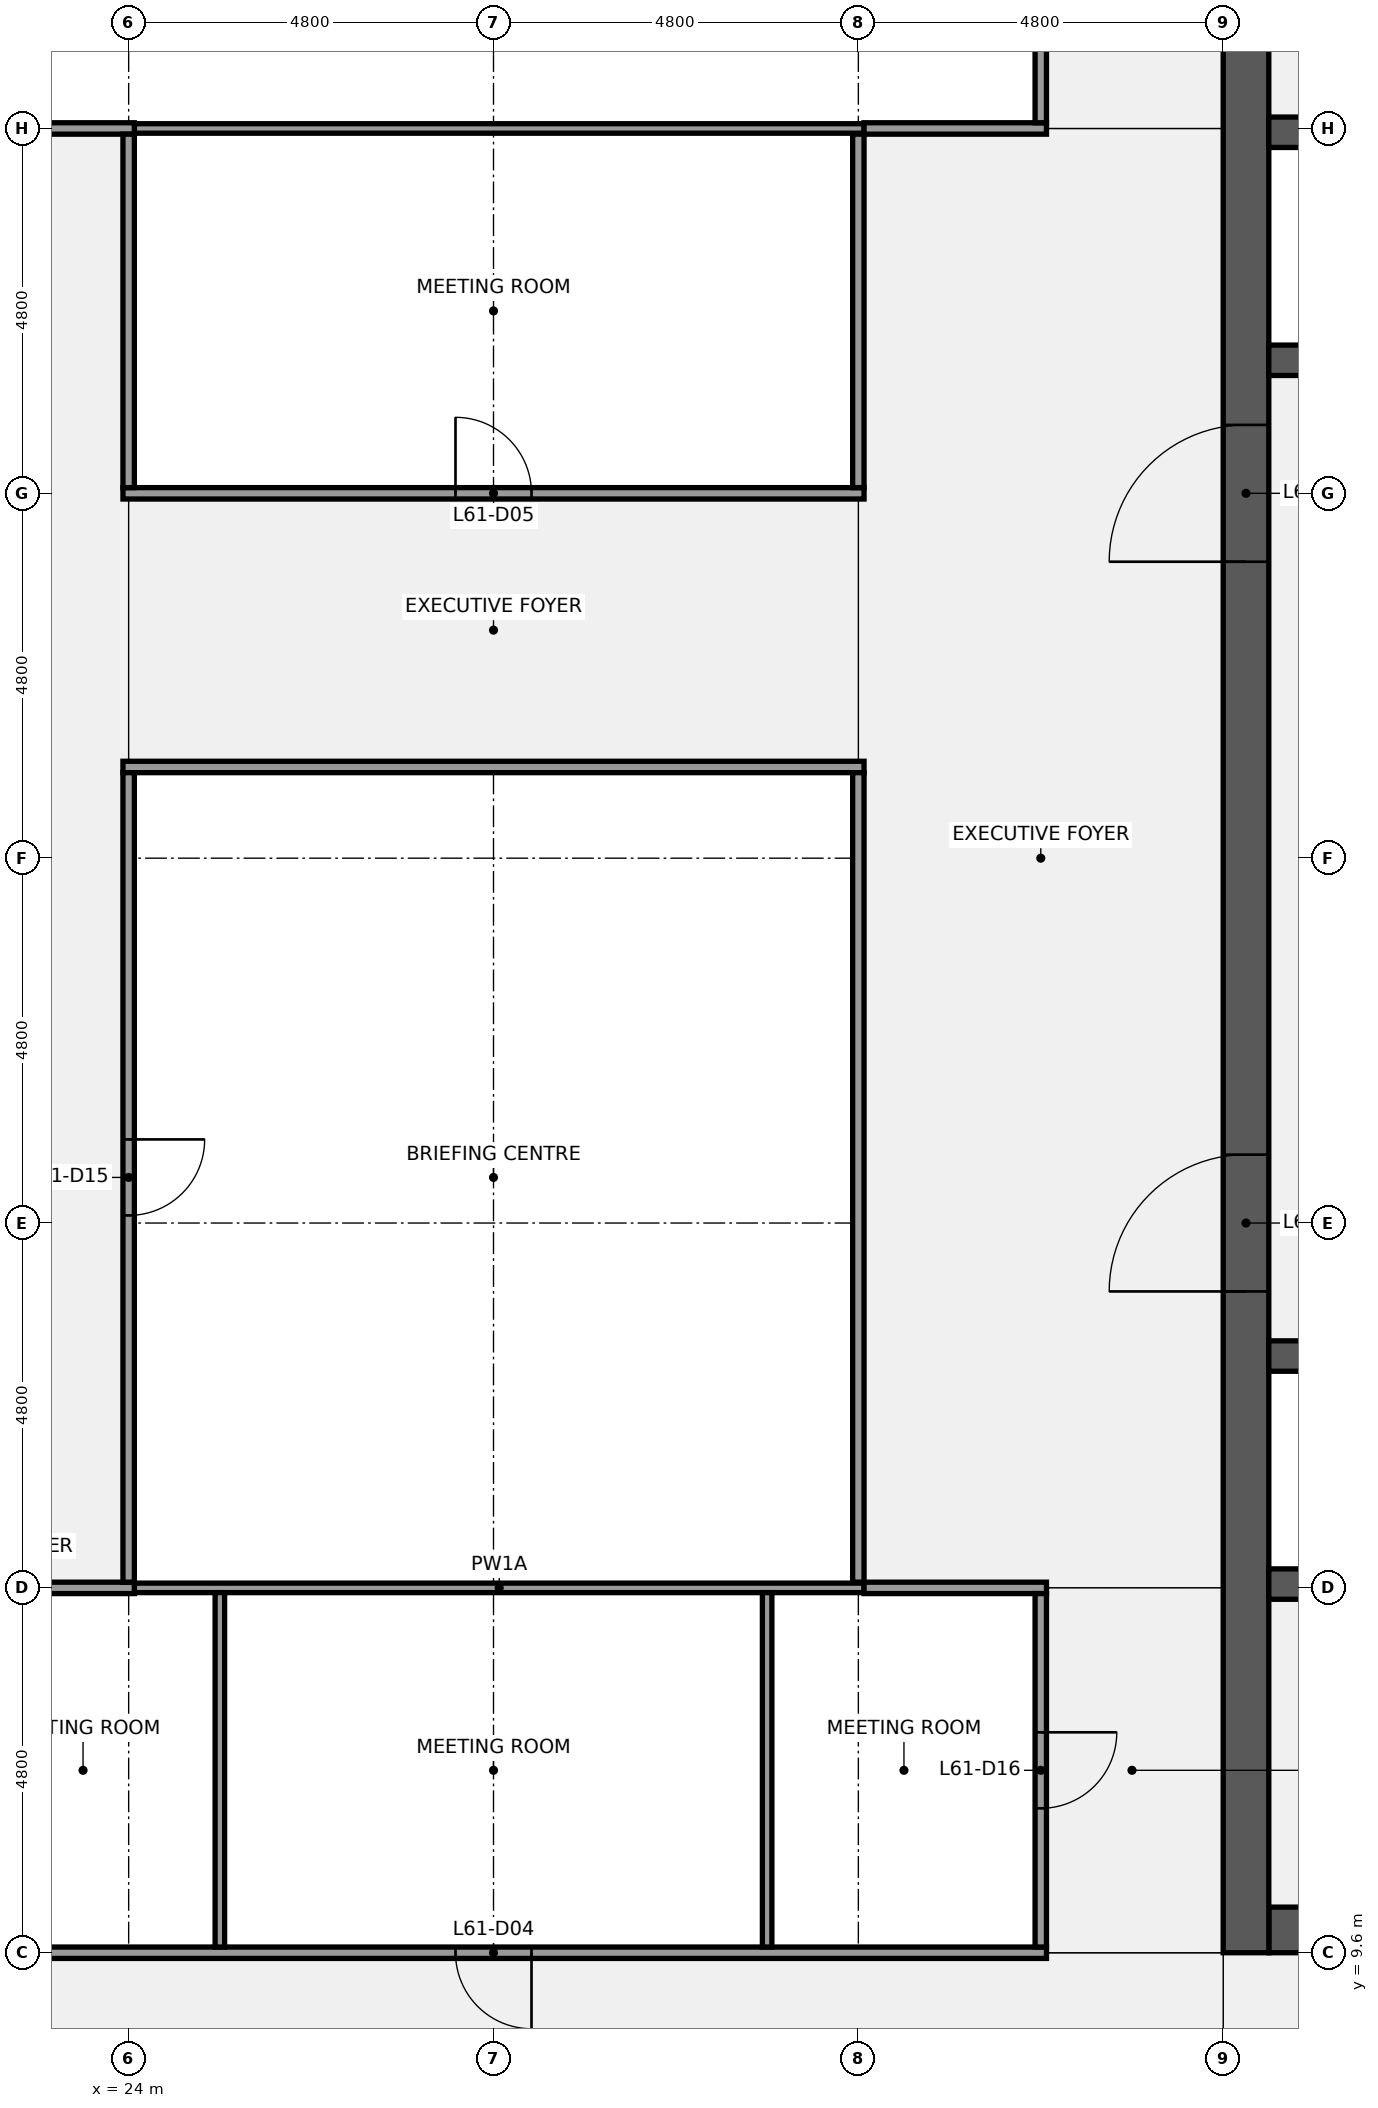
"""IFC4 building model, lengths in metres.
Left out: names, types, materials, properties, quantities, classifications, styles, units other than length and angle.
Written with IfcOpenShell. Run it as: python <this file> out.ifc"""

import sys

from ifc_helpers import new_model, si_unit, direction, frame, frame_2d, origin, place, context, subcontext, project, spatial, rectangle, extrude, element, fill, save


model = new_model("IFC4")
c1 = context("Model", 3, precision=1e-05, world=origin(), true_north=direction((0.0, 1.0)))
c2 = subcontext(c1, "Body", "Model", "MODEL_VIEW")
j1 = project(units=[si_unit("LENGTHUNIT", "METRE"), si_unit("PLANEANGLEUNIT", "RADIAN")], contexts=[c1])
p1 = place(None, origin())
s1 = spatial("IfcSite", under=j1, at=p1, CompositionType="ELEMENT")
p2 = place(p1, origin())
s2 = spatial("IfcBuilding", under=s1, at=p2, CompositionType="ELEMENT")
p3 = place(p2, frame((0.0, 0.0, 282.3)))
s3 = spatial("IfcBuildingStorey", under=s2, at=p3, CompositionType="ELEMENT", Elevation=282.3)
p4 = place(p3, frame((43.2, 9.9, 0.0), z_axis=(0.0, 0.0, 1.0), x_axis=(-1.0, 0.0, 0.0)))
e1 = element("IfcWall", 1, at=p4, inside=s3, PredefinedType="SHEAR", context=c2, shape_type="SweptSolid", body=[
    extrude(rectangle(XDim=4.2, YDim=0.6, at=frame_2d((2.1, 0.0))), origin(), (0.0, 0.0, 1.0), 3.84),
])
p5 = place(p4, frame((1.85, 0.0, 0.0)))
e2 = element("IfcOpeningElement", 2, at=p5, cuts=e1, PredefinedType="OPENING", context=c2, shape_type="SweptSolid", body=[
    extrude(rectangle(XDim=1.1, YDim=2.1, at=frame_2d((0.55, 1.05))), frame((0.0, 0.31, 0.0), z_axis=(0.0, -1.0, 0.0), x_axis=(1.0, 0.0, 0.0)), (0.0, 0.0, 1.0), 0.62),
])
p6 = place(p3, frame((38.7, 9.6, 0.0), z_axis=(0.0, 0.0, 1.0), x_axis=(0.0, 1.0, 0.0)))
e3 = element("IfcWall", 3, at=p6, inside=s3, PredefinedType="SHEAR", context=c2, shape_type="SweptSolid", body=[
    extrude(rectangle(XDim=28.8, YDim=0.6, at=frame_2d((14.4, 0.0))), origin(), (0.0, 0.0, 1.0), 3.84),
])
p7 = place(p6, frame((8.7, 0.0, 0.0)))
e4 = element("IfcOpeningElement", 4, at=p7, cuts=e3, PredefinedType="OPENING", context=c2, shape_type="SweptSolid", body=[
    extrude(rectangle(XDim=1.8, YDim=2.1, at=frame_2d((0.9, 1.05))), frame((0.0, 0.31, 0.0), z_axis=(0.0, -1.0, 0.0), x_axis=(1.0, 0.0, 0.0)), (0.0, 0.0, 1.0), 0.62),
])
p8 = place(p6, frame((18.3, 0.0, 0.0)))
e5 = element("IfcOpeningElement", 5, at=p8, cuts=e3, PredefinedType="OPENING", context=c2, shape_type="SweptSolid", body=[
    extrude(rectangle(XDim=1.8, YDim=2.1, at=frame_2d((0.9, 1.05))), frame((0.0, 0.31, 0.0), z_axis=(0.0, -1.0, 0.0), x_axis=(1.0, 0.0, 0.0)), (0.0, 0.0, 1.0), 0.62),
])
p9 = place(p3, frame((39.0, 14.45, 0.0), z_axis=(0.0, 0.0, 1.0), x_axis=(1.0, 0.0, 0.0)))
e6 = element("IfcWall", 6, at=p9, inside=s3, PredefinedType="SHEAR", context=c2, shape_type="SweptSolid", body=[
    extrude(rectangle(XDim=18.0, YDim=0.4, at=frame_2d((9.0, 0.0))), origin(), (0.0, 0.0, 1.0), 3.84),
])
p10 = place(p3, frame((39.0, 17.45, 0.0), z_axis=(0.0, 0.0, 1.0), x_axis=(1.0, 0.0, 0.0)))
e7 = element("IfcWall", 7, at=p10, inside=s3, PredefinedType="SHEAR", context=c2, shape_type="SweptSolid", body=[
    extrude(rectangle(XDim=18.0, YDim=0.4, at=frame_2d((9.0, 0.0))), origin(), (0.0, 0.0, 1.0), 3.84),
])
p11 = place(p10, frame((15.137, 0.0, 0.0)))
e8 = element("IfcOpeningElement", 8, at=p11, cuts=e7, PredefinedType="OPENING", context=c2, shape_type="SweptSolid", body=[
    extrude(rectangle(XDim=1.0, YDim=2.1, at=frame_2d((0.5, 1.05))), frame((0.0, 0.21, 0.0), z_axis=(0.0, -1.0, 0.0), x_axis=(1.0, 0.0, 0.0)), (0.0, 0.0, 1.0), 0.42),
])
p12 = place(p10, frame((11.5, 0.0, 0.0)))
e9 = element("IfcOpeningElement", 9, at=p12, cuts=e7, PredefinedType="OPENING", context=c2, shape_type="SweptSolid", body=[
    extrude(rectangle(XDim=1.0, YDim=2.1, at=frame_2d((0.5, 1.05))), frame((0.0, 0.21, 0.0), z_axis=(0.0, -1.0, 0.0), x_axis=(1.0, 0.0, 0.0)), (0.0, 0.0, 1.0), 0.42),
])
p13 = place(p10, frame((7.3, 0.0, 0.0)))
e10 = element("IfcOpeningElement", 10, at=p13, cuts=e7, PredefinedType="OPENING", context=c2, shape_type="SweptSolid", body=[
    extrude(rectangle(XDim=1.0, YDim=2.1, at=frame_2d((0.5, 1.05))), frame((0.0, 0.21, 0.0), z_axis=(0.0, -1.0, 0.0), x_axis=(1.0, 0.0, 0.0)), (0.0, 0.0, 1.0), 0.42),
])
p14 = place(p10, frame((1.863, 0.0, 0.0)))
e11 = element("IfcOpeningElement", 11, at=p14, cuts=e7, PredefinedType="OPENING", context=c2, shape_type="SweptSolid", body=[
    extrude(rectangle(XDim=1.0, YDim=2.1, at=frame_2d((0.5, 1.05))), frame((0.0, 0.21, 0.0), z_axis=(0.0, -1.0, 0.0), x_axis=(1.0, 0.0, 0.0)), (0.0, 0.0, 1.0), 0.42),
])
p15 = place(p3, frame((39.0, 30.55, 0.0), z_axis=(0.0, 0.0, 1.0), x_axis=(1.0, 0.0, 0.0)))
e12 = element("IfcWall", 12, at=p15, inside=s3, PredefinedType="SHEAR", context=c2, shape_type="SweptSolid", body=[
    extrude(rectangle(XDim=18.0, YDim=0.4, at=frame_2d((9.0, 0.0))), origin(), (0.0, 0.0, 1.0), 3.84),
])
p16 = place(p15, frame((15.2, 0.0, 0.0)))
e13 = element("IfcOpeningElement", 13, at=p16, cuts=e12, PredefinedType="OPENING", context=c2, shape_type="SweptSolid", body=[
    extrude(rectangle(XDim=1.2, YDim=2.1, at=frame_2d((0.6, 1.05))), frame((0.0, 0.21, 0.0), z_axis=(0.0, -1.0, 0.0), x_axis=(1.0, 0.0, 0.0)), (0.0, 0.0, 1.0), 0.42),
])
p17 = place(p15, frame((12.6, 0.0, 0.0)))
e14 = element("IfcOpeningElement", 14, at=p17, cuts=e12, PredefinedType="OPENING", context=c2, shape_type="SweptSolid", body=[
    extrude(rectangle(XDim=1.2, YDim=2.1, at=frame_2d((0.6, 1.05))), frame((0.0, 0.21, 0.0), z_axis=(0.0, -1.0, 0.0), x_axis=(1.0, 0.0, 0.0)), (0.0, 0.0, 1.0), 0.42),
])
p18 = place(p15, frame((10.0, 0.0, 0.0)))
e15 = element("IfcOpeningElement", 15, at=p18, cuts=e12, PredefinedType="OPENING", context=c2, shape_type="SweptSolid", body=[
    extrude(rectangle(XDim=1.2, YDim=2.1, at=frame_2d((0.6, 1.05))), frame((0.0, 0.21, 0.0), z_axis=(0.0, -1.0, 0.0), x_axis=(1.0, 0.0, 0.0)), (0.0, 0.0, 1.0), 0.42),
])
p19 = place(p15, frame((6.8, 0.0, 0.0)))
e16 = element("IfcOpeningElement", 16, at=p19, cuts=e12, PredefinedType="OPENING", context=c2, shape_type="SweptSolid", body=[
    extrude(rectangle(XDim=1.2, YDim=2.1, at=frame_2d((0.6, 1.05))), frame((0.0, 0.21, 0.0), z_axis=(0.0, -1.0, 0.0), x_axis=(1.0, 0.0, 0.0)), (0.0, 0.0, 1.0), 0.42),
])
p20 = place(p15, frame((4.2, 0.0, 0.0)))
e17 = element("IfcOpeningElement", 17, at=p20, cuts=e12, PredefinedType="OPENING", context=c2, shape_type="SweptSolid", body=[
    extrude(rectangle(XDim=1.2, YDim=2.1, at=frame_2d((0.6, 1.05))), frame((0.0, 0.21, 0.0), z_axis=(0.0, -1.0, 0.0), x_axis=(1.0, 0.0, 0.0)), (0.0, 0.0, 1.0), 0.42),
])
p21 = place(p15, frame((1.6, 0.0, 0.0)))
e18 = element("IfcOpeningElement", 18, at=p21, cuts=e12, PredefinedType="OPENING", context=c2, shape_type="SweptSolid", body=[
    extrude(rectangle(XDim=1.2, YDim=2.1, at=frame_2d((0.6, 1.05))), frame((0.0, 0.21, 0.0), z_axis=(0.0, -1.0, 0.0), x_axis=(1.0, 0.0, 0.0)), (0.0, 0.0, 1.0), 0.42),
])
p22 = place(p3, frame((39.0, 33.55, 0.0), z_axis=(0.0, 0.0, 1.0), x_axis=(1.0, 0.0, 0.0)))
e19 = element("IfcWall", 19, at=p22, inside=s3, PredefinedType="SHEAR", context=c2, shape_type="SweptSolid", body=[
    extrude(rectangle(XDim=18.0, YDim=0.4, at=frame_2d((9.0, 0.0))), origin(), (0.0, 0.0, 1.0), 3.84),
])
p23 = place(p3, frame((21.525, 9.6, 0.0), z_axis=(0.0, 0.0, 1.0), x_axis=(1.0, 0.0, 0.0)))
e20 = element("IfcWall", 20, at=p23, inside=s3, PredefinedType="PARTITIONING", context=c2, shape_type="SweptSolid", body=[
    extrude(rectangle(XDim=14.55, YDim=0.15, at=frame_2d((7.275, 0.0))), origin(), (0.0, 0.0, 1.0), 2.87),
])
p24 = place(p23, frame((6.775, 0.0, 0.0)))
e21 = element("IfcOpeningElement", 21, at=p24, cuts=e20, PredefinedType="OPENING", context=c2, shape_type="SweptSolid", body=[
    extrude(rectangle(XDim=1.0, YDim=2.1, at=frame_2d((0.5, 1.05))), frame((0.0, 0.085, 0.0), z_axis=(0.0, -1.0, 0.0), x_axis=(1.0, 0.0, 0.0)), (0.0, 0.0, 1.0), 0.17),
])
p25 = place(p3, frame((24.075, 14.4, 0.0), z_axis=(0.0, 0.0, 1.0), x_axis=(1.0, 0.0, 0.0)))
e22 = element("IfcWall", 22, at=p25, inside=s3, PredefinedType="PARTITIONING", context=c2, shape_type="SweptSolid", body=[
    extrude(rectangle(XDim=9.6, YDim=0.125, at=frame_2d((4.8, 0.0))), origin(), (0.0, 0.0, 1.0), 2.87),
])
p26 = place(p3, frame((21.525, 14.4, 0.0), z_axis=(0.0, 0.0, 1.0), x_axis=(1.0, 0.0, 0.0)))
e23 = element("IfcWall", 23, at=p26, inside=s3, PredefinedType="PARTITIONING", context=c2, shape_type="SweptSolid", body=[
    extrude(rectangle(XDim=2.55, YDim=0.15, at=frame_2d((1.275, 0.0))), origin(), (0.0, 0.0, 1.0), 2.87),
])
p27 = place(p3, frame((33.675, 14.4, 0.0), z_axis=(0.0, 0.0, 1.0), x_axis=(1.0, 0.0, 0.0)))
e24 = element("IfcWall", 24, at=p27, inside=s3, PredefinedType="PARTITIONING", context=c2, shape_type="SweptSolid", body=[
    extrude(rectangle(XDim=2.4, YDim=0.15, at=frame_2d((1.2, 0.0))), origin(), (0.0, 0.0, 1.0), 2.87),
])
p28 = place(p3, frame((23.925, 25.2, 0.0), z_axis=(0.0, 0.0, 1.0), x_axis=(1.0, 0.0, 0.0)))
e25 = element("IfcWall", 25, at=p28, inside=s3, PredefinedType="PARTITIONING", context=c2, shape_type="SweptSolid", body=[
    extrude(rectangle(XDim=9.75, YDim=0.15, at=frame_2d((4.875, 0.0))), origin(), (0.0, 0.0, 1.0), 2.87),
])
p29 = place(p3, frame((23.925, 28.8, 0.0), z_axis=(0.0, 0.0, 1.0), x_axis=(1.0, 0.0, 0.0)))
e26 = element("IfcWall", 26, at=p29, inside=s3, PredefinedType="PARTITIONING", context=c2, shape_type="SweptSolid", body=[
    extrude(rectangle(XDim=9.75, YDim=0.15, at=frame_2d((4.875, 0.0))), origin(), (0.0, 0.0, 1.0), 2.87),
])
p30 = place(p29, frame((4.375, 0.0, 0.0)))
e27 = element("IfcOpeningElement", 27, at=p30, cuts=e26, PredefinedType="OPENING", context=c2, shape_type="SweptSolid", body=[
    extrude(rectangle(XDim=1.0, YDim=2.1, at=frame_2d((0.5, 1.05))), frame((0.0, 0.085, 0.0), z_axis=(0.0, -1.0, 0.0), x_axis=(1.0, 0.0, 0.0)), (0.0, 0.0, 1.0), 0.17),
])
p31 = place(p3, frame((24.075, 33.6, 0.0), z_axis=(0.0, 0.0, 1.0), x_axis=(1.0, 0.0, 0.0)))
e28 = element("IfcWall", 28, at=p31, inside=s3, PredefinedType="PARTITIONING", context=c2, shape_type="SweptSolid", body=[
    extrude(rectangle(XDim=9.6, YDim=0.125, at=frame_2d((4.8, 0.0))), origin(), (0.0, 0.0, 1.0), 2.87),
])
p32 = place(p3, frame((21.525, 33.6, 0.0), z_axis=(0.0, 0.0, 1.0), x_axis=(1.0, 0.0, 0.0)))
e29 = element("IfcWall", 29, at=p32, inside=s3, PredefinedType="PARTITIONING", context=c2, shape_type="SweptSolid", body=[
    extrude(rectangle(XDim=2.55, YDim=0.15, at=frame_2d((1.275, 0.0))), origin(), (0.0, 0.0, 1.0), 2.87),
])
p33 = place(p3, frame((33.675, 33.6, 0.0), z_axis=(0.0, 0.0, 1.0), x_axis=(1.0, 0.0, 0.0)))
e30 = element("IfcWall", 30, at=p33, inside=s3, PredefinedType="PARTITIONING", context=c2, shape_type="SweptSolid", body=[
    extrude(rectangle(XDim=2.4, YDim=0.15, at=frame_2d((1.2, 0.0))), origin(), (0.0, 0.0, 1.0), 2.87),
])
p34 = place(p3, frame((24.0, 14.475, 0.0), z_axis=(0.0, 0.0, 1.0), x_axis=(0.0, 1.0, 0.0)))
e31 = element("IfcWall", 31, at=p34, inside=s3, PredefinedType="PARTITIONING", context=c2, shape_type="SweptSolid", body=[
    extrude(rectangle(XDim=10.65, YDim=0.15, at=frame_2d((5.325, 0.0))), origin(), (0.0, 0.0, 1.0), 2.87),
])
p35 = place(p34, frame((4.825, 0.0, 0.0)))
e32 = element("IfcOpeningElement", 32, at=p35, cuts=e31, PredefinedType="OPENING", context=c2, shape_type="SweptSolid", body=[
    extrude(rectangle(XDim=1.0, YDim=2.1, at=frame_2d((0.5, 1.05))), frame((0.0, 0.085, 0.0), z_axis=(0.0, -1.0, 0.0), x_axis=(1.0, 0.0, 0.0)), (0.0, 0.0, 1.0), 0.17),
])
p36 = place(p3, frame((24.0, 28.875, 0.0), z_axis=(0.0, 0.0, 1.0), x_axis=(0.0, 1.0, 0.0)))
e33 = element("IfcWall", 33, at=p36, inside=s3, PredefinedType="PARTITIONING", context=c2, shape_type="SweptSolid", body=[
    extrude(rectangle(XDim=4.65, YDim=0.15, at=frame_2d((2.325, 0.0))), origin(), (0.0, 0.0, 1.0), 2.87),
])
for number, where, z_axis, x_axis in (
    (34, (25.2, 9.675, 0.0), (0.0, 0.0, 1.0), (0.0, 1.0, 0.0)),
    (35, (32.4, 9.675, 0.0), (0.0, 0.0, 1.0), (0.0, 1.0, 0.0)),
):
    element("IfcWall", number, at=place(p3, frame(where, z_axis=z_axis, x_axis=x_axis)), inside=s3, PredefinedType="PARTITIONING", context=c2, shape_type="SweptSolid", body=[
        extrude(rectangle(XDim=4.662, YDim=0.125, at=frame_2d((2.331, 0.0))), origin(), (0.0, 0.0, 1.0), 2.87),
    ])
p37 = place(p3, frame((33.6, 14.475, 0.0), z_axis=(0.0, 0.0, 1.0), x_axis=(0.0, 1.0, 0.0)))
e36 = element("IfcWall", 36, at=p37, inside=s3, PredefinedType="PARTITIONING", context=c2, shape_type="SweptSolid", body=[
    extrude(rectangle(XDim=10.65, YDim=0.15, at=frame_2d((5.325, 0.0))), origin(), (0.0, 0.0, 1.0), 2.87),
])
p38 = place(p3, frame((33.6, 28.875, 0.0), z_axis=(0.0, 0.0, 1.0), x_axis=(0.0, 1.0, 0.0)))
e37 = element("IfcWall", 37, at=p38, inside=s3, PredefinedType="PARTITIONING", context=c2, shape_type="SweptSolid", body=[
    extrude(rectangle(XDim=4.65, YDim=0.15, at=frame_2d((2.325, 0.0))), origin(), (0.0, 0.0, 1.0), 2.87),
])
p39 = place(p3, frame((36.0, 9.675, 0.0), z_axis=(0.0, 0.0, 1.0), x_axis=(0.0, 1.0, 0.0)))
e38 = element("IfcWall", 38, at=p39, inside=s3, PredefinedType="PARTITIONING", context=c2, shape_type="SweptSolid", body=[
    extrude(rectangle(XDim=4.65, YDim=0.15, at=frame_2d((2.325, 0.0))), origin(), (0.0, 0.0, 1.0), 2.87),
])
p40 = place(p39, frame((1.825, 0.0, 0.0)))
e39 = element("IfcOpeningElement", 39, at=p40, cuts=e38, PredefinedType="OPENING", context=c2, shape_type="SweptSolid", body=[
    extrude(rectangle(XDim=1.0, YDim=2.1, at=frame_2d((0.5, 1.05))), frame((0.0, 0.085, 0.0), z_axis=(0.0, -1.0, 0.0), x_axis=(1.0, 0.0, 0.0)), (0.0, 0.0, 1.0), 0.17),
])
p41 = place(p3, frame((36.0, 33.675, 0.0), z_axis=(0.0, 0.0, 1.0), x_axis=(0.0, 1.0, 0.0)))
e40 = element("IfcWall", 40, at=p41, inside=s3, PredefinedType="PARTITIONING", context=c2, shape_type="SweptSolid", body=[
    extrude(rectangle(XDim=4.65, YDim=0.15, at=frame_2d((2.325, 0.0))), origin(), (0.0, 0.0, 1.0), 2.87),
])
p42 = place(p7, origin())
e41 = element("IfcDoor", 41, at=p42, inside=s3, OperationType="DOUBLE_DOOR_SINGLE_SWING", PredefinedType="DOOR", context=c2, shape_type="SweptSolid", body=[
    extrude(rectangle(XDim=1.8, YDim=2.1, at=frame_2d((0.9, 1.05))), frame((0.0, 0.025, 0.0), z_axis=(0.0, -1.0, 0.0), x_axis=(1.0, 0.0, 0.0)), (0.0, 0.0, 1.0), 0.05),
])
fill(e4, e41)
p43 = place(p8, origin())
e42 = element("IfcDoor", 42, at=p43, inside=s3, OperationType="DOUBLE_DOOR_SINGLE_SWING", PredefinedType="DOOR", context=c2, shape_type="SweptSolid", body=[
    extrude(rectangle(XDim=1.8, YDim=2.1, at=frame_2d((0.9, 1.05))), frame((0.0, 0.025, 0.0), z_axis=(0.0, -1.0, 0.0), x_axis=(1.0, 0.0, 0.0)), (0.0, 0.0, 1.0), 0.05),
])
fill(e5, e42)
p44 = place(p24, origin())
e43 = element("IfcDoor", 43, at=p44, inside=s3, OperationType="SINGLE_SWING_RIGHT", PredefinedType="DOOR", context=c2, shape_type="SweptSolid", body=[
    extrude(rectangle(XDim=1.0, YDim=2.1, at=frame_2d((0.5, 1.05))), frame((0.0, 0.025, 0.0), z_axis=(0.0, -1.0, 0.0), x_axis=(1.0, 0.0, 0.0)), (0.0, 0.0, 1.0), 0.05),
])
fill(e21, e43)
p45 = place(p30, origin())
e44 = element("IfcDoor", 44, at=p45, inside=s3, OperationType="SINGLE_SWING_LEFT", PredefinedType="DOOR", context=c2, shape_type="SweptSolid", body=[
    extrude(rectangle(XDim=1.0, YDim=2.1, at=frame_2d((0.5, 1.05))), frame((0.0, 0.025, 0.0), z_axis=(0.0, -1.0, 0.0), x_axis=(1.0, 0.0, 0.0)), (0.0, 0.0, 1.0), 0.05),
])
fill(e27, e44)
p46 = place(p35, origin())
e45 = element("IfcDoor", 45, at=p46, inside=s3, OperationType="SINGLE_SWING_RIGHT", PredefinedType="DOOR", context=c2, shape_type="SweptSolid", body=[
    extrude(rectangle(XDim=1.0, YDim=2.1, at=frame_2d((0.5, 1.05))), frame((0.0, 0.025, 0.0), z_axis=(0.0, -1.0, 0.0), x_axis=(1.0, 0.0, 0.0)), (0.0, 0.0, 1.0), 0.05),
])
fill(e32, e45)
p47 = place(p40, origin())
e46 = element("IfcDoor", 46, at=p47, inside=s3, OperationType="SINGLE_SWING_RIGHT", PredefinedType="DOOR", context=c2, shape_type="SweptSolid", body=[
    extrude(rectangle(XDim=1.0, YDim=2.1, at=frame_2d((0.5, 1.05))), frame((0.0, 0.025, 0.0), z_axis=(0.0, -1.0, 0.0), x_axis=(1.0, 0.0, 0.0)), (0.0, 0.0, 1.0), 0.05),
])
fill(e39, e46)
save(model, sys.argv[1])
